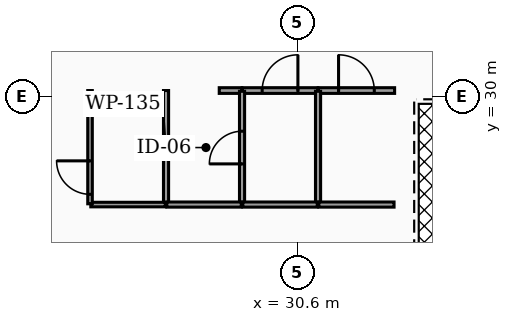
"""IFC4 building model, lengths in metres.
Left out: names, types, materials, properties, quantities, classifications, styles, units other than length and angle.
Written with IfcOpenShell. Run it as: python <this file> out.ifc"""

import sys

from ifc_helpers import new_model, si_unit, direction, frame, frame_2d, origin, place, context, subcontext, project, spatial, rectangle, extrude, element, fill, save


model = new_model("IFC4")
c1 = context("Model", 3, precision=1e-05, world=origin(), true_north=direction((0.0, 1.0)))
c2 = subcontext(c1, "Body", "Model", "MODEL_VIEW")
j1 = project(units=[si_unit("LENGTHUNIT", "METRE"), si_unit("PLANEANGLEUNIT", "RADIAN")], contexts=[c1])
p1 = place(None, origin())
s1 = spatial("IfcSite", under=j1, at=p1, CompositionType="ELEMENT")
p2 = place(p1, origin())
s2 = spatial("IfcBuilding", under=s1, at=p2, CompositionType="ELEMENT")
p3 = place(p2, frame((0.0, 0.0, 130.9)))
s3 = spatial("IfcBuildingStorey", under=s2, at=p3, CompositionType="ELEMENT", Elevation=130.9)
p4 = place(p3, frame((28.55, 30.15, 0.0), z_axis=(0.0, 0.0, 1.0), x_axis=(1.0, 0.0, 0.0)))
e1 = element("IfcWall", 1, at=p4, inside=s3, PredefinedType="PARTITIONING", context=c2, shape_type="SweptSolid", body=[
    extrude(rectangle(XDim=0.595, YDim=0.15, at=frame_2d((0.297, 0.0))), origin(), (0.0, 0.0, 1.0), 2.457),
])
p5 = place(p3, frame((29.155, 30.15, 0.0), z_axis=(0.0, 0.0, 1.0), x_axis=(1.0, 0.0, 0.0)))
e2 = element("IfcWall", 2, at=p5, inside=s3, PredefinedType="PARTITIONING", context=c2, shape_type="SweptSolid", body=[
    extrude(rectangle(XDim=1.99, YDim=0.15, at=frame_2d((0.995, 0.0))), origin(), (0.0, 0.0, 1.0), 2.457),
])
p6 = place(p5, frame((0.525, 0.0, 0.0)))
e3 = element("IfcOpeningElement", 3, at=p6, cuts=e2, PredefinedType="OPENING", context=c2, shape_type="SweptSolid", body=[
    extrude(rectangle(XDim=0.94, YDim=2.05, at=frame_2d((0.47, 1.025))), frame((0.0, 0.085, 0.0), z_axis=(0.0, -1.0, 0.0), x_axis=(1.0, 0.0, 0.0)), (0.0, 0.0, 1.0), 0.17),
])
p7 = place(p3, frame((31.155, 30.15, 0.0), z_axis=(0.0, 0.0, 1.0), x_axis=(1.0, 0.0, 0.0)))
e4 = element("IfcWall", 4, at=p7, inside=s3, PredefinedType="PARTITIONING", context=c2, shape_type="SweptSolid", body=[
    extrude(rectangle(XDim=2.01, YDim=0.15, at=frame_2d((1.005, 0.0))), origin(), (0.0, 0.0, 1.0), 2.457),
])
p8 = place(p7, frame((0.535, 0.0, 0.0)))
e5 = element("IfcOpeningElement", 5, at=p8, cuts=e4, PredefinedType="OPENING", context=c2, shape_type="SweptSolid", body=[
    extrude(rectangle(XDim=0.94, YDim=2.05, at=frame_2d((0.47, 1.025))), frame((0.0, 0.085, 0.0), z_axis=(0.0, -1.0, 0.0), x_axis=(1.0, 0.0, 0.0)), (0.0, 0.0, 1.0), 0.17),
])
p9 = place(p3, frame((27.15, 27.17, 0.0), z_axis=(0.0, 0.0, 1.0), x_axis=(0.0, 1.0, 0.0)))
e6 = element("IfcWall", 6, at=p9, inside=s3, PredefinedType="PARTITIONING", context=c2, shape_type="SweptSolid", body=[
    extrude(rectangle(XDim=2.98, YDim=0.135, at=frame_2d((1.49, 0.0))), origin(), (0.0, 0.0, 1.0), 2.457),
])
p10 = place(p3, frame((25.17, 27.15, 0.0), z_axis=(0.0, 0.0, 1.0), x_axis=(1.0, 0.0, 0.0)))
e7 = element("IfcWall", 7, at=p10, inside=s3, PredefinedType="PARTITIONING", context=c2, shape_type="SweptSolid", body=[
    extrude(rectangle(XDim=1.96, YDim=0.12, at=frame_2d((0.98, 0.0))), origin(), (0.0, 0.0, 1.0), 2.457),
])
p11 = place(p3, frame((25.15, 27.17, 0.0), z_axis=(0.0, 0.0, 1.0), x_axis=(0.0, 1.0, 0.0)))
e8 = element("IfcWall", 8, at=p11, inside=s3, PredefinedType="PARTITIONING", context=c2, shape_type="SweptSolid", body=[
    extrude(rectangle(XDim=2.98, YDim=0.12, at=frame_2d((1.49, 0.0))), origin(), (0.0, 0.0, 1.0), 2.457),
])
p12 = place(p11, frame((0.25, 0.0, 0.0)))
e9 = element("IfcOpeningElement", 9, at=p12, cuts=e8, PredefinedType="OPENING", context=c2, shape_type="SweptSolid", body=[
    extrude(rectangle(XDim=0.88, YDim=2.05, at=frame_2d((0.44, 1.025))), frame((0.0, 0.07, 0.0), z_axis=(0.0, -1.0, 0.0), x_axis=(1.0, 0.0, 0.0)), (0.0, 0.0, 1.0), 0.14),
])
p13 = place(p3, frame((29.15, 27.17, 0.0), z_axis=(0.0, 0.0, 1.0), x_axis=(0.0, 1.0, 0.0)))
e10 = element("IfcWall", 10, at=p13, inside=s3, PredefinedType="PARTITIONING", context=c2, shape_type="SweptSolid", body=[
    extrude(rectangle(XDim=2.96, YDim=0.135, at=frame_2d((1.48, 0.0))), origin(), (0.0, 0.0, 1.0), 2.457),
])
p14 = place(p13, frame((1.05, 0.0, 0.0)))
e11 = element("IfcOpeningElement", 11, at=p14, cuts=e10, PredefinedType="OPENING", context=c2, shape_type="SweptSolid", body=[
    extrude(rectangle(XDim=0.86, YDim=2.05, at=frame_2d((0.43, 1.025))), frame((0.0, 0.077, 0.0), z_axis=(0.0, -1.0, 0.0), x_axis=(1.0, 0.0, 0.0)), (0.0, 0.0, 1.0), 0.155),
])
p15 = place(p3, frame((27.17, 27.15, 0.0), z_axis=(0.0, 0.0, 1.0), x_axis=(1.0, 0.0, 0.0)))
e12 = element("IfcWall", 12, at=p15, inside=s3, PredefinedType="PARTITIONING", context=c2, shape_type="SweptSolid", body=[
    extrude(rectangle(XDim=1.96, YDim=0.135, at=frame_2d((0.98, 0.0))), origin(), (0.0, 0.0, 1.0), 2.457),
])
p16 = place(p3, frame((31.15, 27.17, 0.0), z_axis=(0.0, 0.0, 1.0), x_axis=(0.0, 1.0, 0.0)))
e13 = element("IfcWall", 13, at=p16, inside=s3, PredefinedType="PARTITIONING", context=c2, shape_type="SweptSolid", body=[
    extrude(rectangle(XDim=2.96, YDim=0.135, at=frame_2d((1.48, 0.0))), origin(), (0.0, 0.0, 1.0), 2.457),
])
p17 = place(p3, frame((29.17, 27.15, 0.0), z_axis=(0.0, 0.0, 1.0), x_axis=(1.0, 0.0, 0.0)))
e14 = element("IfcWall", 14, at=p17, inside=s3, PredefinedType="PARTITIONING", context=c2, shape_type="SweptSolid", body=[
    extrude(rectangle(XDim=1.96, YDim=0.135, at=frame_2d((0.98, 0.0))), origin(), (0.0, 0.0, 1.0), 2.457),
])
p18 = place(p3, frame((31.17, 27.15, 0.0), z_axis=(0.0, 0.0, 1.0), x_axis=(1.0, 0.0, 0.0)))
e15 = element("IfcWall", 15, at=p18, inside=s3, PredefinedType="PARTITIONING", context=c2, shape_type="SweptSolid", body=[
    extrude(rectangle(XDim=1.98, YDim=0.135, at=frame_2d((0.99, 0.0))), origin(), (0.0, 0.0, 1.0), 2.457),
])
p19 = place(p6, origin())
e16 = element("IfcDoor", 16, at=p19, inside=s3, OperationType="SINGLE_SWING_RIGHT", PredefinedType="DOOR", context=c2, shape_type="SweptSolid", body=[
    extrude(rectangle(XDim=0.94, YDim=2.05, at=frame_2d((0.47, 1.025))), frame((0.0, 0.025, 0.0), z_axis=(0.0, -1.0, 0.0), x_axis=(1.0, 0.0, 0.0)), (0.0, 0.0, 1.0), 0.05),
])
fill(e3, e16)
p20 = place(p8, origin())
e17 = element("IfcDoor", 17, at=p20, inside=s3, OperationType="SINGLE_SWING_LEFT", PredefinedType="DOOR", context=c2, shape_type="SweptSolid", body=[
    extrude(rectangle(XDim=0.94, YDim=2.05, at=frame_2d((0.47, 1.025))), frame((0.0, 0.025, 0.0), z_axis=(0.0, -1.0, 0.0), x_axis=(1.0, 0.0, 0.0)), (0.0, 0.0, 1.0), 0.05),
])
fill(e5, e17)
p21 = place(p12, origin())
e18 = element("IfcDoor", 18, at=p21, inside=s3, OperationType="SINGLE_SWING_RIGHT", PredefinedType="DOOR", context=c2, shape_type="SweptSolid", body=[
    extrude(rectangle(XDim=0.88, YDim=2.05, at=frame_2d((0.44, 1.025))), frame((0.0, 0.025, 0.0), z_axis=(0.0, -1.0, 0.0), x_axis=(1.0, 0.0, 0.0)), (0.0, 0.0, 1.0), 0.05),
])
fill(e9, e18)
p22 = place(p14, origin())
e19 = element("IfcDoor", 19, at=p22, inside=s3, OperationType="SINGLE_SWING_LEFT", PredefinedType="DOOR", context=c2, shape_type="SweptSolid", body=[
    extrude(rectangle(XDim=0.86, YDim=2.05, at=frame_2d((0.43, 1.025))), frame((0.0, 0.025, 0.0), z_axis=(0.0, -1.0, 0.0), x_axis=(1.0, 0.0, 0.0)), (0.0, 0.0, 1.0), 0.05),
])
fill(e11, e19)
save(model, sys.argv[1])
